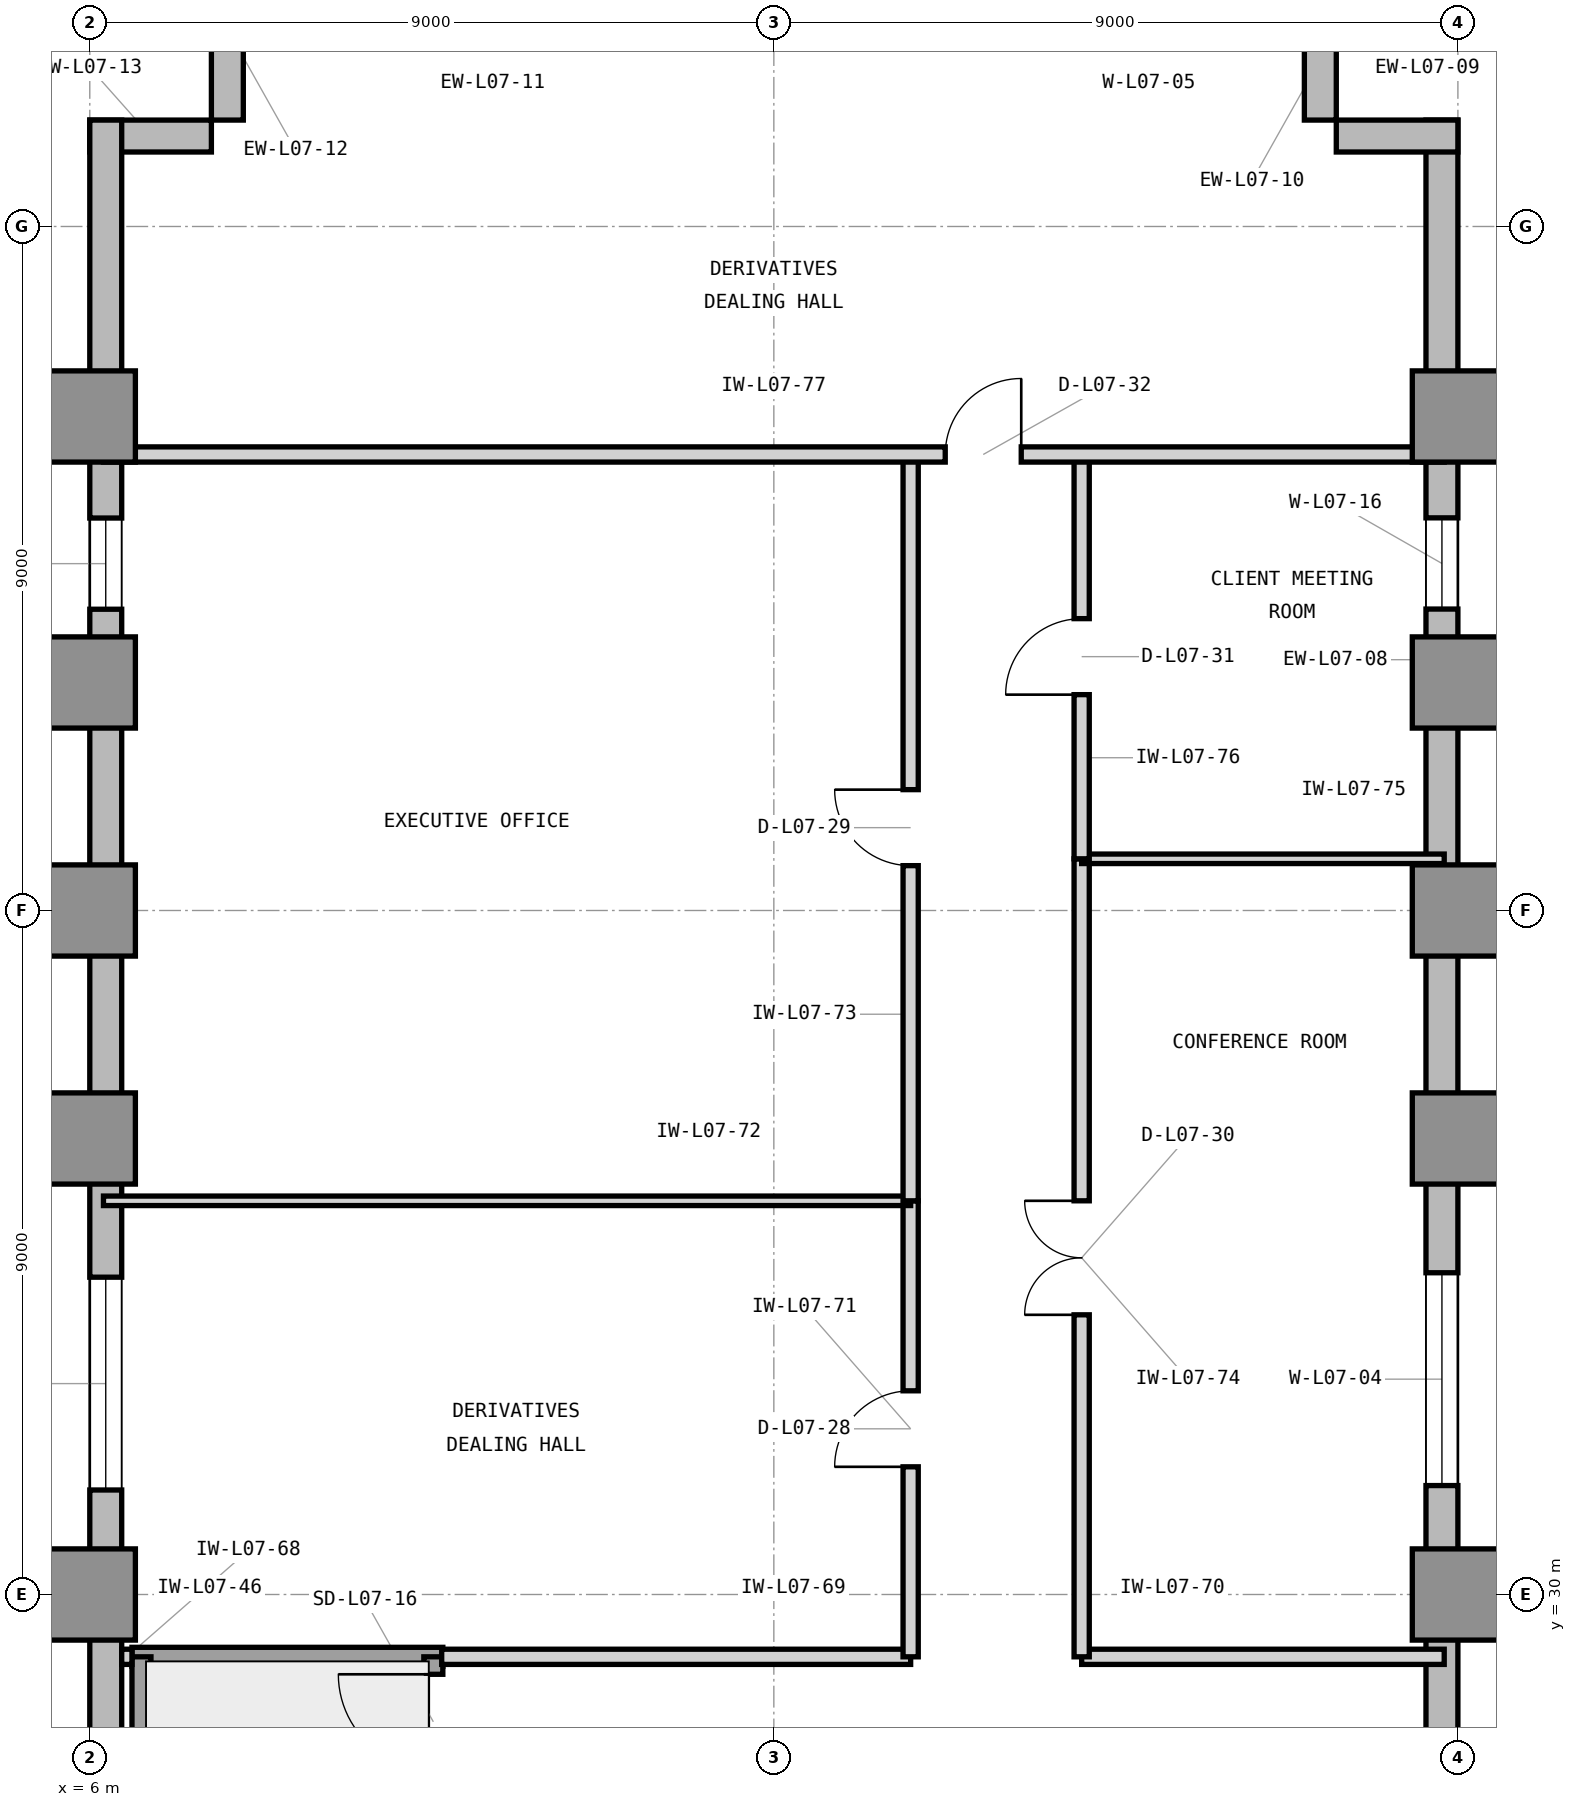
"""IFC4 building model, lengths in metres.
Left out: names, types, materials, properties, quantities, classifications, styles, units other than length and angle.
Written with IfcOpenShell. Run it as: python <this file> out.ifc"""

import sys

from ifc_helpers import new_model, si_unit, direction, frame, frame_2d, origin, origin_2d, place, context, subcontext, project, spatial, rectangle, extrude, element, fill, save


model = new_model("IFC4")
c1 = context("Model", 3, precision=1e-05, world=origin(), true_north=direction((0.0, 1.0)))
c2 = subcontext(c1, "Body", "Model", "MODEL_VIEW")
j1 = project(units=[si_unit("LENGTHUNIT", "METRE"), si_unit("PLANEANGLEUNIT", "RADIAN")], contexts=[c1])
p1 = place(None, origin())
s1 = spatial("IfcSite", under=j1, at=p1, CompositionType="ELEMENT")
p2 = place(p1, origin())
s2 = spatial("IfcBuilding", under=s1, at=p2, CompositionType="ELEMENT")
p3 = place(p2, frame((0.0, 0.0, 34.2)))
s3 = spatial("IfcBuildingStorey", under=s2, at=p3, CompositionType="ELEMENT", Elevation=34.2)
for number, where, z_axis, x_axis in (
    (1, (6.0, 30.0, 0.0), (0.0, 0.0, 1.0), (1.0, 0.0, 0.0)),
    (2, (24.0, 30.0, 0.0), (0.0, 0.0, 1.0), (1.0, 0.0, 0.0)),
    (3, (6.0, 36.0, 0.0), (0.0, 0.0, 1.0), (1.0, 0.0, 0.0)),
    (4, (24.0, 36.0, 0.0), (0.0, 0.0, 1.0), (1.0, 0.0, 0.0)),
    (5, (6.0, 39.0, 0.0), (0.0, 0.0, 1.0), (1.0, 0.0, 0.0)),
    (6, (24.0, 39.0, 0.0), (0.0, 0.0, 1.0), (1.0, 0.0, 0.0)),
    (7, (6.0, 42.0, 0.0), (0.0, 0.0, 1.0), (1.0, 0.0, 0.0)),
    (8, (24.0, 42.0, 0.0), (0.0, 0.0, 1.0), (1.0, 0.0, 0.0)),
    (9, (6.0, 45.5, 0.0), (0.0, 0.0, 1.0), (1.0, 0.0, 0.0)),
    (10, (24.0, 45.5, 0.0), (0.0, 0.0, 1.0), (1.0, 0.0, 0.0)),
):
    element("IfcColumn", number, at=place(p3, frame(where, z_axis=z_axis, x_axis=x_axis)), inside=s3, PredefinedType="COLUMN", context=c2, shape_type="SweptSolid", body=[
        extrude(rectangle(XDim=1.2, YDim=1.2, at=origin_2d()), origin(), (0.0, 0.0, 1.0), 4.2),
    ])
p4 = place(p3, frame((23.79, 21.0, 0.0), z_axis=(0.0, 0.0, 1.0), x_axis=(0.0, 1.0, 0.0)))
e11 = element("IfcWall", 11, at=p4, inside=s3, PredefinedType="STANDARD", context=c2, shape_type="SweptSolid", body=[
    extrude(rectangle(XDim=28.4, YDim=0.42, at=frame_2d((14.2, 0.0))), origin(), (0.0, 0.0, 1.0), 3.98),
])
p5 = place(p4, frame((10.433, 0.0, 0.85)))
e12 = element("IfcOpeningElement", 12, at=p5, cuts=e11, PredefinedType="OPENING", context=c2, shape_type="SweptSolid", body=[
    extrude(rectangle(XDim=2.8, YDim=2.45, at=frame_2d((1.4, 1.225))), frame((0.0, 0.22, 0.0), z_axis=(0.0, -1.0, 0.0), x_axis=(1.0, 0.0, 0.0)), (0.0, 0.0, 1.0), 0.44),
])
p6 = place(p4, frame((21.966, 0.0, 0.85)))
e13 = element("IfcOpeningElement", 13, at=p6, cuts=e11, PredefinedType="OPENING", context=c2, shape_type="SweptSolid", body=[
    extrude(rectangle(XDim=1.2, YDim=2.45, at=frame_2d((0.6, 1.225))), frame((0.0, 0.22, 0.0), z_axis=(0.0, -1.0, 0.0), x_axis=(1.0, 0.0, 0.0)), (0.0, 0.0, 1.0), 0.44),
])
for number, where, z_axis, x_axis in (
    (14, (24.0, 49.19, 0.0), (0.0, 0.0, 1.0), (-1.0, 0.0, 0.0)),
    (15, (22.19, 49.4, 0.0), (0.0, 0.0, 1.0), (0.0, 1.0, 0.0)),
    (16, (7.81, 51.0, 0.0), (0.0, 0.0, 1.0), (0.0, -1.0, 0.0)),
    (17, (7.6, 49.19, 0.0), (0.0, 0.0, 1.0), (-1.0, 0.0, 0.0)),
):
    element("IfcWall", number, at=place(p3, frame(where, z_axis=z_axis, x_axis=x_axis)), inside=s3, PredefinedType="STANDARD", context=c2, shape_type="SweptSolid", body=[
        extrude(rectangle(XDim=1.6, YDim=0.42, at=frame_2d((0.8, 0.0))), origin(), (0.0, 0.0, 1.0), 3.98),
    ])
p7 = place(p3, frame((6.21, 49.4, 0.0), z_axis=(0.0, 0.0, 1.0), x_axis=(0.0, -1.0, 0.0)))
e18 = element("IfcWall", 18, at=p7, inside=s3, PredefinedType="STANDARD", context=c2, shape_type="SweptSolid", body=[
    extrude(rectangle(XDim=28.5, YDim=0.42, at=frame_2d((14.25, 0.0))), origin(), (0.0, 0.0, 1.0), 3.98),
])
p8 = place(p7, frame((15.225, 0.0, 0.85)))
e19 = element("IfcOpeningElement", 19, at=p8, cuts=e18, PredefinedType="OPENING", context=c2, shape_type="SweptSolid", body=[
    extrude(rectangle(XDim=2.8, YDim=2.45, at=frame_2d((1.4, 1.225))), frame((0.0, 0.22, 0.0), z_axis=(0.0, -1.0, 0.0), x_axis=(1.0, 0.0, 0.0)), (0.0, 0.0, 1.0), 0.44),
])
p9 = place(p7, frame((5.236, 0.0, 0.85)))
e20 = element("IfcOpeningElement", 20, at=p9, cuts=e18, PredefinedType="OPENING", context=c2, shape_type="SweptSolid", body=[
    extrude(rectangle(XDim=1.2, YDim=2.45, at=frame_2d((0.6, 1.225))), frame((0.0, 0.22, 0.0), z_axis=(0.0, -1.0, 0.0), x_axis=(1.0, 0.0, 0.0)), (0.0, 0.0, 1.0), 0.44),
])
p10 = place(p3, frame((6.555, 29.18, 0.0), z_axis=(0.0, 0.0, 1.0), x_axis=(1.0, 0.0, 0.0)))
e21 = element("IfcWall", 21, at=p10, inside=s3, PredefinedType="SHEAR", context=c2, shape_type="SweptSolid", body=[
    extrude(rectangle(XDim=4.09, YDim=0.25, at=frame_2d((2.045, 0.0))), origin(), (0.0, 0.0, 1.0), 4.2),
])
p11 = place(p3, frame((6.68, 21.68, 0.0), z_axis=(0.0, 0.0, 1.0), x_axis=(0.0, 1.0, 0.0)))
e22 = element("IfcWall", 22, at=p11, inside=s3, PredefinedType="SHEAR", context=c2, shape_type="SweptSolid", body=[
    extrude(rectangle(XDim=7.5, YDim=0.25, at=frame_2d((3.75, 0.0))), origin(), (0.0, 0.0, 1.0), 4.2),
])
p12 = place(p3, frame((10.52, 21.68, 0.0), z_axis=(0.0, 0.0, 1.0), x_axis=(0.0, 1.0, 0.0)))
e23 = element("IfcWall", 23, at=p12, inside=s3, PredefinedType="SHEAR", context=c2, shape_type="SweptSolid", body=[
    extrude(rectangle(XDim=7.5, YDim=0.25, at=frame_2d((3.75, 0.0))), origin(), (0.0, 0.0, 1.0), 4.2),
])
p13 = place(p12, frame((6.02, 0.0, 0.0)))
e24 = element("IfcOpeningElement", 24, at=p13, cuts=e23, PredefinedType="OPENING", context=c2, shape_type="SweptSolid", body=[
    extrude(rectangle(XDim=1.25, YDim=2.2, at=frame_2d((0.625, 1.1))), frame((0.0, 0.135, 0.0), z_axis=(0.0, -1.0, 0.0), x_axis=(1.0, 0.0, 0.0)), (0.0, 0.0, 1.0), 0.27),
])
p14 = place(p3, frame((6.42, 29.18, 0.0), z_axis=(0.0, 0.0, 1.0), x_axis=(1.0, 0.0, 0.0)))
e25 = element("IfcWall", 25, at=p14, inside=s3, PredefinedType="PARTITIONING", context=c2, shape_type="SweptSolid", body=[
    extrude(rectangle(XDim=0.135, YDim=0.2, at=frame_2d((0.067, 0.0))), origin(), (0.0, 0.0, 1.0), 3.97),
])
p15 = place(p3, frame((10.63, 29.18, 0.0), z_axis=(0.0, 0.0, 1.0), x_axis=(1.0, 0.0, 0.0)))
e26 = element("IfcWall", 26, at=p15, inside=s3, PredefinedType="PARTITIONING", context=c2, shape_type="SweptSolid", body=[
    extrude(rectangle(XDim=6.17, YDim=0.2, at=frame_2d((3.085, 0.0))), origin(), (0.0, 0.0, 1.0), 3.97),
])
p16 = place(p3, frame((19.05, 29.18, 0.0), z_axis=(0.0, 0.0, 1.0), x_axis=(1.0, 0.0, 0.0)))
e27 = element("IfcWall", 27, at=p16, inside=s3, PredefinedType="PARTITIONING", context=c2, shape_type="SweptSolid", body=[
    extrude(rectangle(XDim=4.77, YDim=0.2, at=frame_2d((2.385, 0.0))), origin(), (0.0, 0.0, 1.0), 3.97),
])
p17 = place(p3, frame((16.8, 29.18, 0.0), z_axis=(0.0, 0.0, 1.0), x_axis=(0.0, 1.0, 0.0)))
e28 = element("IfcWall", 28, at=p17, inside=s3, PredefinedType="PARTITIONING", context=c2, shape_type="SweptSolid", body=[
    extrude(rectangle(XDim=6.0, YDim=0.2, at=frame_2d((3.0, 0.0))), origin(), (0.0, 0.0, 1.0), 3.97),
])
p18 = place(p17, frame((2.5, 0.0, 0.0)))
e29 = element("IfcOpeningElement", 29, at=p18, cuts=e28, PredefinedType="OPENING", context=c2, shape_type="SweptSolid", body=[
    extrude(rectangle(XDim=1.0, YDim=2.15, at=frame_2d((0.5, 1.075))), frame((0.0, 0.11, 0.0), z_axis=(0.0, -1.0, 0.0), x_axis=(1.0, 0.0, 0.0)), (0.0, 0.0, 1.0), 0.22),
])
p19 = place(p3, frame((6.18, 35.18, 0.0), z_axis=(0.0, 0.0, 1.0), x_axis=(1.0, 0.0, 0.0)))
e30 = element("IfcWall", 30, at=p19, inside=s3, PredefinedType="PARTITIONING", context=c2, shape_type="SweptSolid", body=[
    extrude(rectangle(XDim=10.62, YDim=0.125, at=frame_2d((5.31, 0.0))), origin(), (0.0, 0.0, 1.0), 3.97),
])
p20 = place(p3, frame((16.8, 35.18, 0.0), z_axis=(0.0, 0.0, 1.0), x_axis=(0.0, 1.0, 0.0)))
e31 = element("IfcWall", 31, at=p20, inside=s3, PredefinedType="PARTITIONING", context=c2, shape_type="SweptSolid", body=[
    extrude(rectangle(XDim=9.82, YDim=0.2, at=frame_2d((4.91, 0.0))), origin(), (0.0, 0.0, 1.0), 3.97),
])
p21 = place(p20, frame((4.41, 0.0, 0.0)))
e32 = element("IfcOpeningElement", 32, at=p21, cuts=e31, PredefinedType="OPENING", context=c2, shape_type="SweptSolid", body=[
    extrude(rectangle(XDim=1.0, YDim=2.15, at=frame_2d((0.5, 1.075))), frame((0.0, 0.11, 0.0), z_axis=(0.0, -1.0, 0.0), x_axis=(1.0, 0.0, 0.0)), (0.0, 0.0, 1.0), 0.22),
])
p22 = place(p3, frame((19.05, 29.18, 0.0), z_axis=(0.0, 0.0, 1.0), x_axis=(0.0, 1.0, 0.0)))
e33 = element("IfcWall", 33, at=p22, inside=s3, PredefinedType="PARTITIONING", context=c2, shape_type="SweptSolid", body=[
    extrude(rectangle(XDim=10.5, YDim=0.2, at=frame_2d((5.25, 0.0))), origin(), (0.0, 0.0, 1.0), 3.97),
])
p23 = place(p22, frame((4.5, 0.0, 0.0)))
e34 = element("IfcOpeningElement", 34, at=p23, cuts=e33, PredefinedType="OPENING", context=c2, shape_type="SweptSolid", body=[
    extrude(rectangle(XDim=1.5, YDim=2.3, at=frame_2d((0.75, 1.15))), frame((0.0, 0.11, 0.0), z_axis=(0.0, -1.0, 0.0), x_axis=(1.0, 0.0, 0.0)), (0.0, 0.0, 1.0), 0.22),
])
p24 = place(p3, frame((19.05, 39.68, 0.0), z_axis=(0.0, 0.0, 1.0), x_axis=(1.0, 0.0, 0.0)))
e35 = element("IfcWall", 35, at=p24, inside=s3, PredefinedType="PARTITIONING", context=c2, shape_type="SweptSolid", body=[
    extrude(rectangle(XDim=4.77, YDim=0.125, at=frame_2d((2.385, 0.0))), origin(), (0.0, 0.0, 1.0), 3.97),
])
p25 = place(p3, frame((19.05, 39.68, 0.0), z_axis=(0.0, 0.0, 1.0), x_axis=(0.0, 1.0, 0.0)))
e36 = element("IfcWall", 36, at=p25, inside=s3, PredefinedType="PARTITIONING", context=c2, shape_type="SweptSolid", body=[
    extrude(rectangle(XDim=5.32, YDim=0.2, at=frame_2d((2.66, 0.0))), origin(), (0.0, 0.0, 1.0), 3.97),
])
p26 = place(p25, frame((2.16, 0.0, 0.0)))
e37 = element("IfcOpeningElement", 37, at=p26, cuts=e36, PredefinedType="OPENING", context=c2, shape_type="SweptSolid", body=[
    extrude(rectangle(XDim=1.0, YDim=2.15, at=frame_2d((0.5, 1.075))), frame((0.0, 0.11, 0.0), z_axis=(0.0, -1.0, 0.0), x_axis=(1.0, 0.0, 0.0)), (0.0, 0.0, 1.0), 0.22),
])
p27 = place(p3, frame((6.18, 45.0, 0.0), z_axis=(0.0, 0.0, 1.0), x_axis=(1.0, 0.0, 0.0)))
e38 = element("IfcWall", 38, at=p27, inside=s3, PredefinedType="PARTITIONING", context=c2, shape_type="SweptSolid", body=[
    extrude(rectangle(XDim=17.64, YDim=0.2, at=frame_2d((8.82, 0.0))), origin(), (0.0, 0.0, 1.0), 3.97),
])
p28 = place(p27, frame((11.075, 0.0, 0.0)))
e39 = element("IfcOpeningElement", 39, at=p28, cuts=e38, PredefinedType="OPENING", context=c2, shape_type="SweptSolid", body=[
    extrude(rectangle(XDim=1.0, YDim=2.15, at=frame_2d((0.5, 1.075))), frame((0.0, 0.11, 0.0), z_axis=(0.0, -1.0, 0.0), x_axis=(1.0, 0.0, 0.0)), (0.0, 0.0, 1.0), 0.22),
])
p29 = place(p5, origin())
e40 = element("IfcWindow", 40, at=p29, inside=s3, PartitioningType="SINGLE_PANEL", PredefinedType="WINDOW", context=c2, shape_type="SweptSolid", body=[
    extrude(rectangle(XDim=2.8, YDim=2.45, at=frame_2d((1.4, 1.225))), frame((0.0, 0.11, 0.0), z_axis=(0.0, -1.0, 0.0), x_axis=(1.0, 0.0, 0.0)), (0.0, 0.0, 1.0), 0.06),
])
fill(e12, e40)
p30 = place(p8, origin())
e41 = element("IfcWindow", 41, at=p30, inside=s3, PartitioningType="SINGLE_PANEL", PredefinedType="WINDOW", context=c2, shape_type="SweptSolid", body=[
    extrude(rectangle(XDim=2.8, YDim=2.45, at=frame_2d((1.4, 1.225))), frame((0.0, 0.11, 0.0), z_axis=(0.0, -1.0, 0.0), x_axis=(1.0, 0.0, 0.0)), (0.0, 0.0, 1.0), 0.06),
])
fill(e19, e41)
p31 = place(p13, origin())
e42 = element("IfcDoor", 42, at=p31, inside=s3, OperationType="SINGLE_SWING_RIGHT", PredefinedType="DOOR", context=c2, shape_type="SweptSolid", body=[
    extrude(rectangle(XDim=1.25, YDim=2.2, at=frame_2d((0.625, 1.1))), frame((0.0, 0.025, 0.0), z_axis=(0.0, -1.0, 0.0), x_axis=(1.0, 0.0, 0.0)), (0.0, 0.0, 1.0), 0.05),
])
fill(e24, e42)
p32 = place(p18, origin())
e43 = element("IfcDoor", 43, at=p32, inside=s3, OperationType="SINGLE_SWING_LEFT", PredefinedType="DOOR", context=c2, shape_type="SweptSolid", body=[
    extrude(rectangle(XDim=1.0, YDim=2.15, at=frame_2d((0.5, 1.075))), frame((0.0, 0.025, 0.0), z_axis=(0.0, -1.0, 0.0), x_axis=(1.0, 0.0, 0.0)), (0.0, 0.0, 1.0), 0.05),
])
fill(e29, e43)
p33 = place(p21, origin())
e44 = element("IfcDoor", 44, at=p33, inside=s3, OperationType="SINGLE_SWING_RIGHT", PredefinedType="DOOR", context=c2, shape_type="SweptSolid", body=[
    extrude(rectangle(XDim=1.0, YDim=2.15, at=frame_2d((0.5, 1.075))), frame((0.0, 0.025, 0.0), z_axis=(0.0, -1.0, 0.0), x_axis=(1.0, 0.0, 0.0)), (0.0, 0.0, 1.0), 0.05),
])
fill(e32, e44)
p34 = place(p23, origin())
e45 = element("IfcDoor", 45, at=p34, inside=s3, OperationType="DOUBLE_DOOR_SINGLE_SWING", PredefinedType="DOOR", context=c2, shape_type="SweptSolid", body=[
    extrude(rectangle(XDim=1.5, YDim=2.3, at=frame_2d((0.75, 1.15))), frame((0.0, 0.025, 0.0), z_axis=(0.0, -1.0, 0.0), x_axis=(1.0, 0.0, 0.0)), (0.0, 0.0, 1.0), 0.05),
])
fill(e34, e45)
p35 = place(p26, origin())
e46 = element("IfcDoor", 46, at=p35, inside=s3, OperationType="SINGLE_SWING_LEFT", PredefinedType="DOOR", context=c2, shape_type="SweptSolid", body=[
    extrude(rectangle(XDim=1.0, YDim=2.15, at=frame_2d((0.5, 1.075))), frame((0.0, 0.025, 0.0), z_axis=(0.0, -1.0, 0.0), x_axis=(1.0, 0.0, 0.0)), (0.0, 0.0, 1.0), 0.05),
])
fill(e37, e46)
p36 = place(p28, origin())
e47 = element("IfcDoor", 47, at=p36, inside=s3, OperationType="SINGLE_SWING_RIGHT", PredefinedType="DOOR", context=c2, shape_type="SweptSolid", body=[
    extrude(rectangle(XDim=1.0, YDim=2.15, at=frame_2d((0.5, 1.075))), frame((0.0, 0.025, 0.0), z_axis=(0.0, -1.0, 0.0), x_axis=(1.0, 0.0, 0.0)), (0.0, 0.0, 1.0), 0.05),
])
fill(e39, e47)
p37 = place(p9, origin())
e48 = element("IfcWindow", 48, at=p37, inside=s3, PartitioningType="SINGLE_PANEL", PredefinedType="WINDOW", context=c2, shape_type="SweptSolid", body=[
    extrude(rectangle(XDim=1.2, YDim=2.45, at=frame_2d((0.6, 1.225))), frame((0.0, 0.11, 0.0), z_axis=(0.0, -1.0, 0.0), x_axis=(1.0, 0.0, 0.0)), (0.0, 0.0, 1.0), 0.06),
])
fill(e20, e48)
p38 = place(p6, origin())
e49 = element("IfcWindow", 49, at=p38, inside=s3, PartitioningType="SINGLE_PANEL", PredefinedType="WINDOW", context=c2, shape_type="SweptSolid", body=[
    extrude(rectangle(XDim=1.2, YDim=2.45, at=frame_2d((0.6, 1.225))), frame((0.0, 0.11, 0.0), z_axis=(0.0, -1.0, 0.0), x_axis=(1.0, 0.0, 0.0)), (0.0, 0.0, 1.0), 0.06),
])
fill(e13, e49)
save(model, sys.argv[1])
